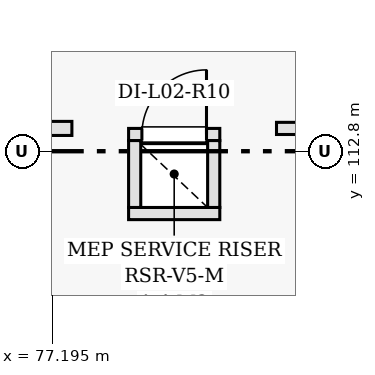
"""IFC4 building model, lengths in metres.
Left out: names, types, materials, properties, quantities, classifications, styles, units other than length and angle.
Written with IfcOpenShell. Run it as: python <this file> out.ifc"""

import sys

from ifc_helpers import new_model, si_unit, direction, frame, frame_2d, origin, place, context, subcontext, project, spatial, rectangle, extrude, element, fill, save


model = new_model("IFC4")
c1 = context("Model", 3, precision=1e-05, world=origin(), true_north=direction((0.0, 1.0)))
c2 = subcontext(c1, "Body", "Model", "MODEL_VIEW")
j1 = project(units=[si_unit("LENGTHUNIT", "METRE"), si_unit("PLANEANGLEUNIT", "RADIAN")], contexts=[c1])
p1 = place(None, origin())
s1 = spatial("IfcSite", under=j1, at=p1, CompositionType="ELEMENT")
p2 = place(p1, origin())
s2 = spatial("IfcBuilding", under=s1, at=p2, CompositionType="ELEMENT")
p3 = place(p2, frame((0.0, 0.0, 9.6)))
s3 = spatial("IfcBuildingStorey", under=s2, at=p3, CompositionType="ELEMENT", Elevation=9.6)
p4 = place(p3, frame((78.2, 111.98, 0.0), z_axis=(0.0, 0.0, 1.0), x_axis=(1.0, 0.0, 0.0)))
e1 = element("IfcWall", 1, at=p4, inside=s3, PredefinedType="PARTITIONING", context=c2, shape_type="SweptSolid", body=[
    extrude(rectangle(XDim=1.2, YDim=0.16, at=frame_2d((0.6, 0.0))), origin(), (0.0, 0.0, 1.0), 3.94),
])
p5 = place(p3, frame((78.2, 113.02, 0.0), z_axis=(0.0, 0.0, 1.0), x_axis=(1.0, 0.0, 0.0)))
e2 = element("IfcWall", 2, at=p5, inside=s3, PredefinedType="PARTITIONING", context=c2, shape_type="SweptSolid", body=[
    extrude(rectangle(XDim=1.2, YDim=0.16, at=frame_2d((0.6, 0.0))), origin(), (0.0, 0.0, 1.0), 3.94),
])
p6 = place(p5, frame((0.175, 0.0, 0.0)))
e3 = element("IfcOpeningElement", 3, at=p6, cuts=e2, PredefinedType="OPENING", context=c2, shape_type="SweptSolid", body=[
    extrude(rectangle(XDim=0.85, YDim=2.02, at=frame_2d((0.425, 1.01))), frame((0.0, 0.09, 0.0), z_axis=(0.0, -1.0, 0.0), x_axis=(1.0, 0.0, 0.0)), (0.0, 0.0, 1.0), 0.18),
])
for number, where, z_axis, x_axis in (
    (4, (78.28, 112.06, 0.0), (0.0, 0.0, 1.0), (0.0, 1.0, 0.0)),
    (5, (79.32, 112.06, 0.0), (0.0, 0.0, 1.0), (0.0, 1.0, 0.0)),
):
    element("IfcWall", number, at=place(p3, frame(where, z_axis=z_axis, x_axis=x_axis)), inside=s3, PredefinedType="PARTITIONING", context=c2, shape_type="SweptSolid", body=[
        extrude(rectangle(XDim=0.88, YDim=0.16, at=frame_2d((0.44, 0.0))), origin(), (0.0, 0.0, 1.0), 3.94),
    ])
p7 = place(p3, frame((80.146, 113.1, 0.0), z_axis=(0.0, 0.0, 1.0), x_axis=(1.0, 0.0, 0.0)))
e6 = element("IfcWall", 6, at=p7, inside=s3, PredefinedType="PARTITIONING", context=c2, shape_type="SweptSolid", body=[
    extrude(rectangle(XDim=4.834, YDim=0.16, at=frame_2d((2.417, 0.0))), origin(), (0.0, 0.0, 1.0), 3.275),
])
p8 = place(p3, frame((39.44, 113.1, 0.0), z_axis=(0.0, 0.0, 1.0), x_axis=(1.0, 0.0, 0.0)))
e7 = element("IfcWall", 7, at=p8, inside=s3, PredefinedType="PARTITIONING", context=c2, shape_type="SweptSolid", body=[
    extrude(rectangle(XDim=38.014, YDim=0.185, at=frame_2d((19.007, 0.0))), origin(), (0.0, 0.0, 1.0), 3.025),
])
p9 = place(p6, origin())
e8 = element("IfcDoor", 8, at=p9, inside=s3, OperationType="SINGLE_SWING_RIGHT", PredefinedType="DOOR", context=c2, shape_type="SweptSolid", body=[
    extrude(rectangle(XDim=0.85, YDim=2.02, at=frame_2d((0.425, 1.01))), frame((0.0, 0.025, 0.0), z_axis=(0.0, -1.0, 0.0), x_axis=(1.0, 0.0, 0.0)), (0.0, 0.0, 1.0), 0.05),
])
fill(e3, e8)
save(model, sys.argv[1])
